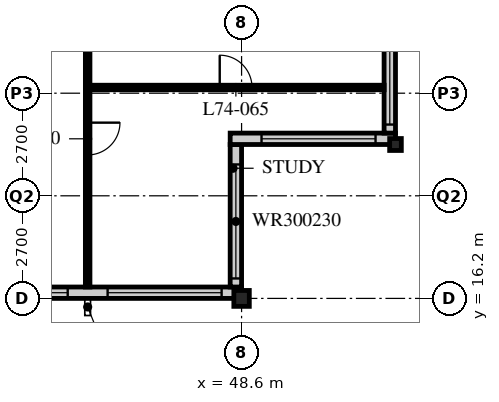
"""IFC4 building model, lengths in metres.
Left out: names, types, materials, properties, quantities, classifications, styles, units other than length and angle.
Written with IfcOpenShell. Run it as: python <this file> out.ifc"""

import sys

from ifc_helpers import new_model, si_unit, direction, frame, frame_2d, origin, origin_2d, place, context, subcontext, project, spatial, rectangle, i_section, extrude, element, fill, save


model = new_model("IFC4")
c1 = context("Model", 3, precision=1e-05, world=origin(), true_north=direction((0.0, 1.0)))
c2 = subcontext(c1, "Body", "Model", "MODEL_VIEW")
j1 = project(units=[si_unit("LENGTHUNIT", "METRE"), si_unit("PLANEANGLEUNIT", "RADIAN")], contexts=[c1])
p1 = place(None, origin())
s1 = spatial("IfcSite", under=j1, at=p1, CompositionType="ELEMENT")
p2 = place(p1, origin())
s2 = spatial("IfcBuilding", under=s1, at=p2, CompositionType="ELEMENT")
p3 = place(p2, frame((0.0, 0.0, 289.2)))
s3 = spatial("IfcBuildingStorey", under=s2, at=p3, CompositionType="ELEMENT", Elevation=289.2)
p4 = place(p3, frame((48.6, 16.2, 0.0), z_axis=(0.0, 0.0, 1.0), x_axis=(1.0, 0.0, 0.0)))
e1 = element("IfcColumn", 1, at=p4, inside=s3, PredefinedType="COLUMN", context=c2, shape_type="SweptSolid", body=[
    extrude(i_section(OverallWidth=0.407, OverallDepth=0.419, WebThickness=0.031, FlangeThickness=0.049, FilletRadius=0.015, at=origin_2d()), origin(), (0.0, 0.0, 1.0), 3.9),
])
p5 = place(p3, frame((52.65, 20.25, 0.0), z_axis=(0.0, 0.0, 1.0), x_axis=(1.0, 0.0, 0.0)))
e2 = element("IfcColumn", 2, at=p5, inside=s3, PredefinedType="COLUMN", context=c2, shape_type="SweptSolid", body=[
    extrude(i_section(OverallWidth=0.307, OverallDepth=0.314, WebThickness=0.012, FlangeThickness=0.019, FilletRadius=0.015, at=origin_2d()), origin(), (0.0, 0.0, 1.0), 3.9),
])
p6 = place(p3, frame((8.4, 16.35, 0.0), z_axis=(0.0, 0.0, 1.0), x_axis=(1.0, 0.0, 0.0)))
e3 = element("IfcWall", 3, at=p6, inside=s3, PredefinedType="SOLIDWALL", context=c2, shape_type="SweptSolid", body=[
    extrude(rectangle(XDim=40.2, YDim=0.3, at=frame_2d((20.1, 0.0))), origin(), (0.0, 0.0, 1.0), 3.69),
])
p7 = place(p6, frame((0.225, 0.0, 0.6)))
e4 = element("IfcOpeningElement", 4, at=p7, cuts=e3, PredefinedType="OPENING", context=c2, shape_type="SweptSolid", body=[
    extrude(rectangle(XDim=3.0, YDim=2.4, at=frame_2d((1.5, 1.2))), frame((0.0, 0.16, 0.0), z_axis=(0.0, -1.0, 0.0), x_axis=(1.0, 0.0, 0.0)), (0.0, 0.0, 1.0), 0.32),
])
p8 = place(p6, frame((4.275, 0.0, 0.6)))
e5 = element("IfcOpeningElement", 5, at=p8, cuts=e3, PredefinedType="OPENING", context=c2, shape_type="SweptSolid", body=[
    extrude(rectangle(XDim=3.0, YDim=2.4, at=frame_2d((1.5, 1.2))), frame((0.0, 0.16, 0.0), z_axis=(0.0, -1.0, 0.0), x_axis=(1.0, 0.0, 0.0)), (0.0, 0.0, 1.0), 0.32),
])
p9 = place(p6, frame((8.325, 0.0, 0.6)))
e6 = element("IfcOpeningElement", 6, at=p9, cuts=e3, PredefinedType="OPENING", context=c2, shape_type="SweptSolid", body=[
    extrude(rectangle(XDim=3.0, YDim=2.4, at=frame_2d((1.5, 1.2))), frame((0.0, 0.16, 0.0), z_axis=(0.0, -1.0, 0.0), x_axis=(1.0, 0.0, 0.0)), (0.0, 0.0, 1.0), 0.32),
])
p10 = place(p6, frame((12.375, 0.0, 0.6)))
e7 = element("IfcOpeningElement", 7, at=p10, cuts=e3, PredefinedType="OPENING", context=c2, shape_type="SweptSolid", body=[
    extrude(rectangle(XDim=3.0, YDim=2.4, at=frame_2d((1.5, 1.2))), frame((0.0, 0.16, 0.0), z_axis=(0.0, -1.0, 0.0), x_axis=(1.0, 0.0, 0.0)), (0.0, 0.0, 1.0), 0.32),
])
p11 = place(p6, frame((16.425, 0.0, 0.6)))
e8 = element("IfcOpeningElement", 8, at=p11, cuts=e3, PredefinedType="OPENING", context=c2, shape_type="SweptSolid", body=[
    extrude(rectangle(XDim=3.0, YDim=2.4, at=frame_2d((1.5, 1.2))), frame((0.0, 0.16, 0.0), z_axis=(0.0, -1.0, 0.0), x_axis=(1.0, 0.0, 0.0)), (0.0, 0.0, 1.0), 0.32),
])
p12 = place(p6, frame((20.475, 0.0, 0.6)))
e9 = element("IfcOpeningElement", 9, at=p12, cuts=e3, PredefinedType="OPENING", context=c2, shape_type="SweptSolid", body=[
    extrude(rectangle(XDim=3.0, YDim=2.4, at=frame_2d((1.5, 1.2))), frame((0.0, 0.16, 0.0), z_axis=(0.0, -1.0, 0.0), x_axis=(1.0, 0.0, 0.0)), (0.0, 0.0, 1.0), 0.32),
])
p13 = place(p6, frame((24.525, 0.0, 0.6)))
e10 = element("IfcOpeningElement", 10, at=p13, cuts=e3, PredefinedType="OPENING", context=c2, shape_type="SweptSolid", body=[
    extrude(rectangle(XDim=3.0, YDim=2.4, at=frame_2d((1.5, 1.2))), frame((0.0, 0.16, 0.0), z_axis=(0.0, -1.0, 0.0), x_axis=(1.0, 0.0, 0.0)), (0.0, 0.0, 1.0), 0.32),
])
p14 = place(p6, frame((28.575, 0.0, 0.6)))
e11 = element("IfcOpeningElement", 11, at=p14, cuts=e3, PredefinedType="OPENING", context=c2, shape_type="SweptSolid", body=[
    extrude(rectangle(XDim=3.0, YDim=2.4, at=frame_2d((1.5, 1.2))), frame((0.0, 0.16, 0.0), z_axis=(0.0, -1.0, 0.0), x_axis=(1.0, 0.0, 0.0)), (0.0, 0.0, 1.0), 0.32),
])
p15 = place(p6, frame((32.625, 0.0, 0.6)))
e12 = element("IfcOpeningElement", 12, at=p15, cuts=e3, PredefinedType="OPENING", context=c2, shape_type="SweptSolid", body=[
    extrude(rectangle(XDim=3.0, YDim=2.4, at=frame_2d((1.5, 1.2))), frame((0.0, 0.16, 0.0), z_axis=(0.0, -1.0, 0.0), x_axis=(1.0, 0.0, 0.0)), (0.0, 0.0, 1.0), 0.32),
])
p16 = place(p6, frame((36.675, 0.0, 0.6)))
e13 = element("IfcOpeningElement", 13, at=p16, cuts=e3, PredefinedType="OPENING", context=c2, shape_type="SweptSolid", body=[
    extrude(rectangle(XDim=3.0, YDim=2.4, at=frame_2d((1.5, 1.2))), frame((0.0, 0.16, 0.0), z_axis=(0.0, -1.0, 0.0), x_axis=(1.0, 0.0, 0.0)), (0.0, 0.0, 1.0), 0.32),
])
p17 = place(p3, frame((48.45, 16.5, 0.0), z_axis=(0.0, 0.0, 1.0), x_axis=(0.0, 1.0, 0.0)))
e14 = element("IfcWall", 14, at=p17, inside=s3, PredefinedType="SOLIDWALL", context=c2, shape_type="SweptSolid", body=[
    extrude(rectangle(XDim=3.75, YDim=0.3, at=frame_2d((1.875, 0.0))), origin(), (0.0, 0.0, 1.0), 3.69),
])
p18 = place(p17, frame((0.225, 0.0, 0.6)))
e15 = element("IfcOpeningElement", 15, at=p18, cuts=e14, PredefinedType="OPENING", context=c2, shape_type="SweptSolid", body=[
    extrude(rectangle(XDim=3.0, YDim=2.3, at=frame_2d((1.5, 1.15))), frame((0.0, 0.16, 0.0), z_axis=(0.0, -1.0, 0.0), x_axis=(1.0, 0.0, 0.0)), (0.0, 0.0, 1.0), 0.32),
])
p19 = place(p3, frame((48.3, 20.4, 0.0), z_axis=(0.0, 0.0, 1.0), x_axis=(1.0, 0.0, 0.0)))
e16 = element("IfcWall", 16, at=p19, inside=s3, PredefinedType="SOLIDWALL", context=c2, shape_type="SweptSolid", body=[
    extrude(rectangle(XDim=4.35, YDim=0.3, at=frame_2d((2.175, 0.0))), origin(), (0.0, 0.0, 1.0), 3.69),
])
p20 = place(p19, frame((0.825, 0.0, 0.6)))
e17 = element("IfcOpeningElement", 17, at=p20, cuts=e16, PredefinedType="OPENING", context=c2, shape_type="SweptSolid", body=[
    extrude(rectangle(XDim=3.0, YDim=2.3, at=frame_2d((1.5, 1.15))), frame((0.0, 0.16, 0.0), z_axis=(0.0, -1.0, 0.0), x_axis=(1.0, 0.0, 0.0)), (0.0, 0.0, 1.0), 0.32),
])
p21 = place(p3, frame((52.5, 20.55, 0.0), z_axis=(0.0, 0.0, 1.0), x_axis=(0.0, 1.0, 0.0)))
e18 = element("IfcWall", 18, at=p21, inside=s3, PredefinedType="SOLIDWALL", context=c2, shape_type="SweptSolid", body=[
    extrude(rectangle(XDim=3.75, YDim=0.3, at=frame_2d((1.875, 0.0))), origin(), (0.0, 0.0, 1.0), 3.69),
])
p22 = place(p21, frame((0.225, 0.0, 0.6)))
e19 = element("IfcOpeningElement", 19, at=p22, cuts=e18, PredefinedType="OPENING", context=c2, shape_type="SweptSolid", body=[
    extrude(rectangle(XDim=3.0, YDim=2.3, at=frame_2d((1.5, 1.15))), frame((0.0, 0.16, 0.0), z_axis=(0.0, -1.0, 0.0), x_axis=(1.0, 0.0, 0.0)), (0.0, 0.0, 1.0), 0.32),
])
p23 = place(p3, frame((44.55, 16.5, 0.0), z_axis=(0.0, 0.0, 1.0), x_axis=(0.0, 1.0, 0.0)))
e20 = element("IfcWall", 20, at=p23, inside=s3, PredefinedType="PARTITIONING", context=c2, shape_type="SweptSolid", body=[
    extrude(rectangle(XDim=7.8, YDim=0.12, at=frame_2d((3.9, 0.0))), origin(), (0.0, 0.0, 1.0), 3.69),
])
p24 = place(p23, frame((3.475, 0.0, 0.0)))
e21 = element("IfcOpeningElement", 21, at=p24, cuts=e20, PredefinedType="OPENING", context=c2, shape_type="SweptSolid", body=[
    extrude(rectangle(XDim=0.85, YDim=2.1, at=frame_2d((0.425, 1.05))), frame((0.0, 0.07, 0.0), z_axis=(0.0, -1.0, 0.0), x_axis=(1.0, 0.0, 0.0)), (0.0, 0.0, 1.0), 0.14),
])
p25 = place(p3, frame((44.55, 21.75, 0.0), z_axis=(0.0, 0.0, 1.0), x_axis=(1.0, 0.0, 0.0)))
e22 = element("IfcWall", 22, at=p25, inside=s3, PredefinedType="PARTITIONING", context=c2, shape_type="SweptSolid", body=[
    extrude(rectangle(XDim=7.8, YDim=0.12, at=frame_2d((3.9, 0.0))), origin(), (0.0, 0.0, 1.0), 3.69),
])
p26 = place(p25, frame((3.475, 0.0, 0.0)))
e23 = element("IfcOpeningElement", 23, at=p26, cuts=e22, PredefinedType="OPENING", context=c2, shape_type="SweptSolid", body=[
    extrude(rectangle(XDim=0.85, YDim=2.1, at=frame_2d((0.425, 1.05))), frame((0.0, 0.07, 0.0), z_axis=(0.0, -1.0, 0.0), x_axis=(1.0, 0.0, 0.0)), (0.0, 0.0, 1.0), 0.14),
])
p27 = place(p15, origin())
e24 = element("IfcWindow", 24, at=p27, inside=s3, PartitioningType="SINGLE_PANEL", PredefinedType="WINDOW", context=c2, shape_type="SweptSolid", body=[
    extrude(rectangle(XDim=3.0, YDim=2.4, at=frame_2d((1.5, 1.2))), frame((0.0, 0.03, 0.0), z_axis=(0.0, -1.0, 0.0), x_axis=(1.0, 0.0, 0.0)), (0.0, 0.0, 1.0), 0.06),
])
fill(e12, e24)
p28 = place(p16, origin())
e25 = element("IfcWindow", 25, at=p28, inside=s3, PartitioningType="SINGLE_PANEL", PredefinedType="WINDOW", context=c2, shape_type="SweptSolid", body=[
    extrude(rectangle(XDim=3.0, YDim=2.4, at=frame_2d((1.5, 1.2))), frame((0.0, 0.03, 0.0), z_axis=(0.0, -1.0, 0.0), x_axis=(1.0, 0.0, 0.0)), (0.0, 0.0, 1.0), 0.06),
])
fill(e13, e25)
p29 = place(p18, origin())
e26 = element("IfcWindow", 26, at=p29, inside=s3, PartitioningType="SINGLE_PANEL", PredefinedType="WINDOW", context=c2, shape_type="SweptSolid", body=[
    extrude(rectangle(XDim=3.0, YDim=2.3, at=frame_2d((1.5, 1.15))), frame((0.0, 0.03, 0.0), z_axis=(0.0, -1.0, 0.0), x_axis=(1.0, 0.0, 0.0)), (0.0, 0.0, 1.0), 0.06),
])
fill(e15, e26)
p30 = place(p20, origin())
e27 = element("IfcWindow", 27, at=p30, inside=s3, PartitioningType="SINGLE_PANEL", PredefinedType="WINDOW", context=c2, shape_type="SweptSolid", body=[
    extrude(rectangle(XDim=3.0, YDim=2.3, at=frame_2d((1.5, 1.15))), frame((0.0, 0.03, 0.0), z_axis=(0.0, -1.0, 0.0), x_axis=(1.0, 0.0, 0.0)), (0.0, 0.0, 1.0), 0.06),
])
fill(e17, e27)
p31 = place(p22, origin())
e28 = element("IfcWindow", 28, at=p31, inside=s3, PartitioningType="SINGLE_PANEL", PredefinedType="WINDOW", context=c2, shape_type="SweptSolid", body=[
    extrude(rectangle(XDim=3.0, YDim=2.3, at=frame_2d((1.5, 1.15))), frame((0.0, 0.03, 0.0), z_axis=(0.0, -1.0, 0.0), x_axis=(1.0, 0.0, 0.0)), (0.0, 0.0, 1.0), 0.06),
])
fill(e19, e28)
p32 = place(p24, origin())
e29 = element("IfcDoor", 29, at=p32, inside=s3, OperationType="SINGLE_SWING_LEFT", PredefinedType="DOOR", context=c2, shape_type="SweptSolid", body=[
    extrude(rectangle(XDim=0.85, YDim=2.1, at=frame_2d((0.425, 1.05))), frame((0.0, 0.025, 0.0), z_axis=(0.0, -1.0, 0.0), x_axis=(1.0, 0.0, 0.0)), (0.0, 0.0, 1.0), 0.05),
])
fill(e21, e29)
p33 = place(p26, origin())
e30 = element("IfcDoor", 30, at=p33, inside=s3, OperationType="SINGLE_SWING_LEFT", PredefinedType="DOOR", context=c2, shape_type="SweptSolid", body=[
    extrude(rectangle(XDim=0.85, YDim=2.1, at=frame_2d((0.425, 1.05))), frame((0.0, 0.025, 0.0), z_axis=(0.0, -1.0, 0.0), x_axis=(1.0, 0.0, 0.0)), (0.0, 0.0, 1.0), 0.05),
])
fill(e23, e30)
save(model, sys.argv[1])
